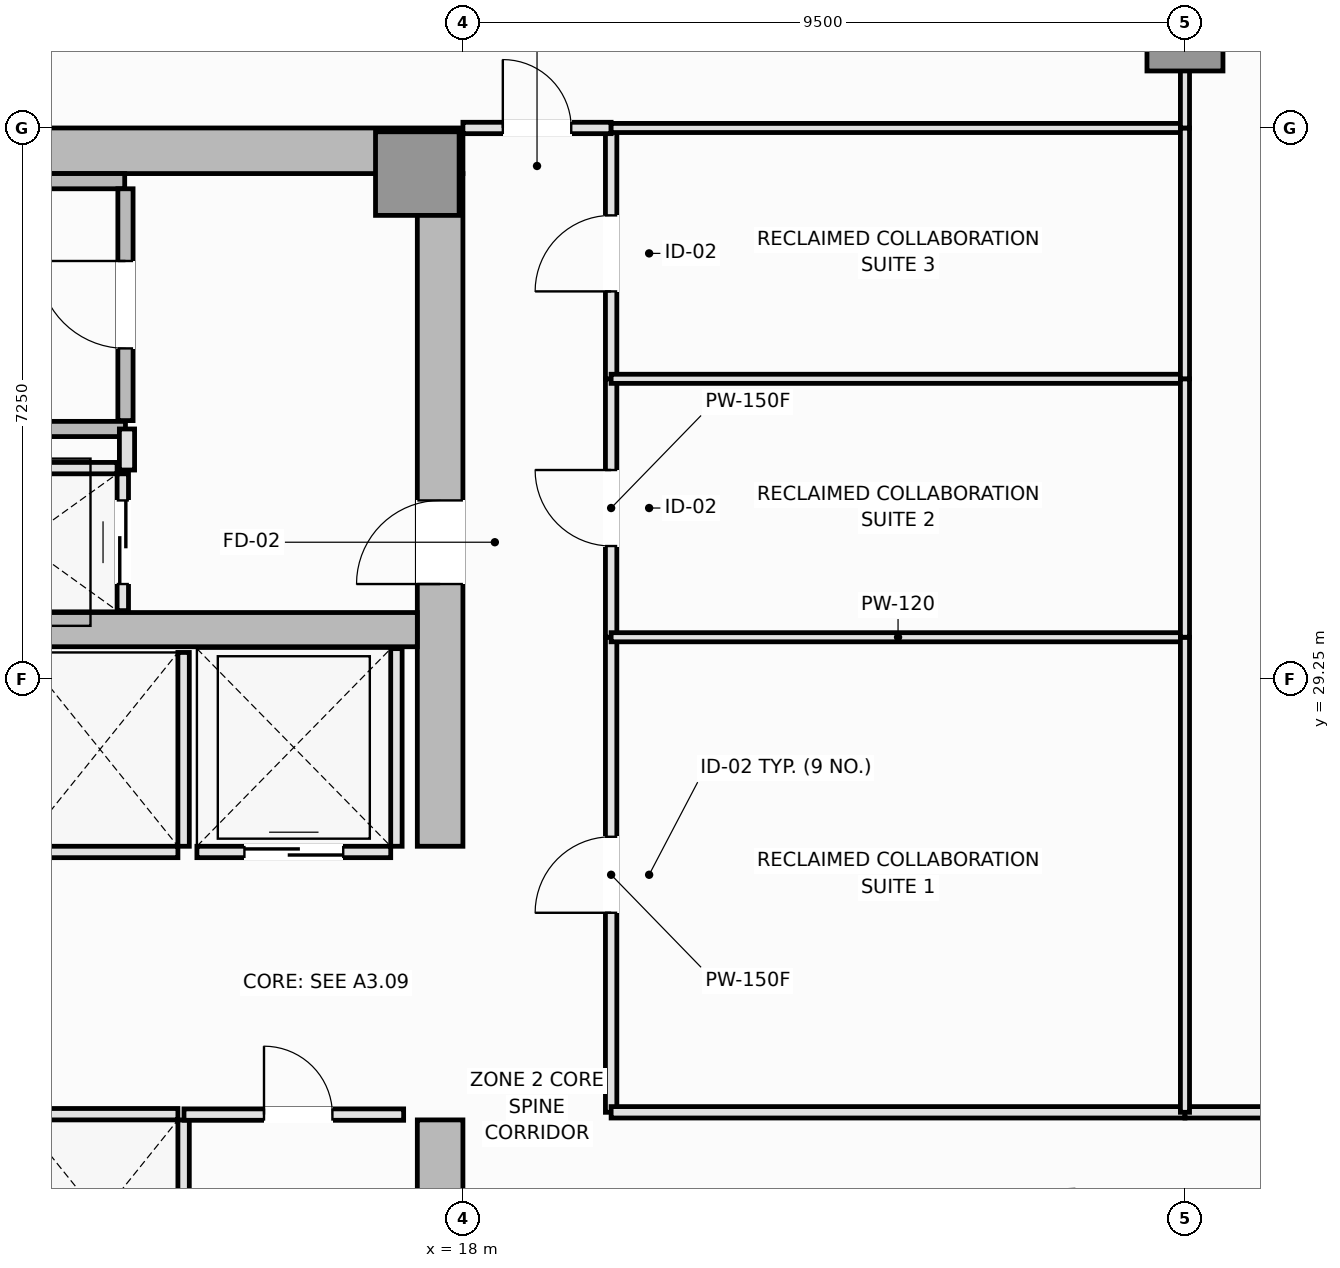
"""IFC4 building model, lengths in metres.
Left out: names, types, materials, properties, quantities, classifications, styles, units other than length and angle.
Written with IfcOpenShell. Run it as: python <this file> out.ifc"""

import sys

from ifc_helpers import new_model, si_unit, direction, frame, frame_2d, origin, origin_2d, place, context, subcontext, project, spatial, rectangle, extrude, element, fill, save


model = new_model("IFC4")
c1 = context("Model", 3, precision=1e-05, world=origin(), true_north=direction((0.0, 1.0)))
c2 = subcontext(c1, "Body", "Model", "MODEL_VIEW")
j1 = project(units=[si_unit("LENGTHUNIT", "METRE"), si_unit("PLANEANGLEUNIT", "RADIAN")], contexts=[c1])
p1 = place(None, origin())
s1 = spatial("IfcSite", under=j1, at=p1, CompositionType="ELEMENT")
p2 = place(p1, origin())
s2 = spatial("IfcBuilding", under=s1, at=p2, CompositionType="ELEMENT")
p3 = place(p2, frame((0.0, 0.0, 127.1)))
s3 = spatial("IfcBuildingStorey", under=s2, at=p3, CompositionType="ELEMENT", Elevation=127.1)
p4 = place(p3, frame((4.5, 36.2, 0.0), z_axis=(0.0, 0.0, 1.0), x_axis=(1.0, 0.0, 0.0)))
e1 = element("IfcWall", 1, at=p4, inside=s3, PredefinedType="SHEAR", context=c2, shape_type="SweptSolid", body=[
    extrude(rectangle(XDim=13.5, YDim=0.6, at=frame_2d((6.75, 0.0))), origin(), (0.0, 0.0, 1.0), 3.55),
])
p5 = place(p3, frame((17.7, 14.6, 0.0), z_axis=(0.0, 0.0, 1.0), x_axis=(0.0, 1.0, 0.0)))
e2 = element("IfcWall", 2, at=p5, inside=s3, PredefinedType="SHEAR", context=c2, shape_type="SweptSolid", body=[
    extrude(rectangle(XDim=8.85, YDim=0.6, at=frame_2d((4.425, 0.0))), origin(), (0.0, 0.0, 1.0), 3.55),
])
p6 = place(p5, frame((4.3, 0.0, 0.0)))
e3 = element("IfcOpeningElement", 3, at=p6, cuts=e2, PredefinedType="OPENING", context=c2, shape_type="SweptSolid", body=[
    extrude(rectangle(XDim=1.1, YDim=2.15, at=frame_2d((0.55, 1.075))), frame((0.0, 0.31, 0.0), z_axis=(0.0, -1.0, 0.0), x_axis=(1.0, 0.0, 0.0)), (0.0, 0.0, 1.0), 0.62),
])
p7 = place(p3, frame((17.7, 27.05, 0.0), z_axis=(0.0, 0.0, 1.0), x_axis=(0.0, 1.0, 0.0)))
e4 = element("IfcWall", 4, at=p7, inside=s3, PredefinedType="SHEAR", context=c2, shape_type="SweptSolid", body=[
    extrude(rectangle(XDim=8.85, YDim=0.6, at=frame_2d((4.425, 0.0))), origin(), (0.0, 0.0, 1.0), 3.55),
])
p8 = place(p7, frame((3.45, 0.0, 0.0)))
e5 = element("IfcOpeningElement", 5, at=p8, cuts=e4, PredefinedType="OPENING", context=c2, shape_type="SweptSolid", body=[
    extrude(rectangle(XDim=1.1, YDim=2.15, at=frame_2d((0.55, 1.075))), frame((0.0, 0.31, 0.0), z_axis=(0.0, -1.0, 0.0), x_axis=(1.0, 0.0, 0.0)), (0.0, 0.0, 1.0), 0.62),
])
p9 = place(p3, frame((5.1, 29.9, 0.0), z_axis=(0.0, 0.0, 1.0), x_axis=(1.0, 0.0, 0.0)))
e6 = element("IfcWall", 6, at=p9, inside=s3, PredefinedType="SHEAR", context=c2, shape_type="SweptSolid", body=[
    extrude(rectangle(XDim=12.3, YDim=0.45, at=frame_2d((6.15, 0.0))), origin(), (0.0, 0.0, 1.0), 3.55),
])
p10 = place(p3, frame((17.4, 35.9, 0.0), z_axis=(0.0, 0.0, 1.0), x_axis=(1.0, 0.0, 0.0)))
e7 = element("IfcColumn", 7, at=p10, inside=s3, PredefinedType="PILASTER", context=c2, shape_type="SweptSolid", body=[
    extrude(rectangle(XDim=1.1, YDim=1.1, at=origin_2d()), origin(), (0.0, 0.0, 1.0), 3.55),
])
p11 = place(p3, frame((27.5, 37.75, 0.0), z_axis=(0.0, 0.0, 1.0), x_axis=(1.0, 0.0, 0.0)))
e8 = element("IfcColumn", 8, at=p11, inside=s3, PredefinedType="COLUMN", context=c2, shape_type="SweptSolid", body=[
    extrude(rectangle(XDim=1.0, YDim=1.0, at=origin_2d()), origin(), (0.0, 0.0, 1.0), 3.55),
])
p12 = place(p3, frame((5.8, 35.8, 0.0), z_axis=(0.0, 0.0, 1.0), x_axis=(1.0, 0.0, 0.0)))
e9 = element("IfcWall", 9, at=p12, inside=s3, PredefinedType="SOLIDWALL", context=c2, shape_type="SweptSolid", body=[
    extrude(rectangle(XDim=7.75, YDim=0.2, at=frame_2d((3.875, 0.0))), origin(), (0.0, 0.0, 1.0), 3.55),
])
p13 = place(p3, frame((5.9, 32.54, 0.0), z_axis=(0.0, 0.0, 1.0), x_axis=(1.0, 0.0, 0.0)))
e10 = element("IfcWall", 10, at=p13, inside=s3, PredefinedType="SOLIDWALL", context=c2, shape_type="SweptSolid", body=[
    extrude(rectangle(XDim=7.66, YDim=0.2, at=frame_2d((3.83, 0.0))), origin(), (0.0, 0.0, 1.0), 3.55),
])
p14 = place(p3, frame((13.56, 32.65, 0.0), z_axis=(0.0, 0.0, 1.0), x_axis=(0.0, 1.0, 0.0)))
e11 = element("IfcWall", 11, at=p14, inside=s3, PredefinedType="SOLIDWALL", context=c2, shape_type="SweptSolid", body=[
    extrude(rectangle(XDim=3.05, YDim=0.2, at=frame_2d((1.525, 0.0))), origin(), (0.0, 0.0, 1.0), 3.55),
])
p15 = place(p14, frame((0.95, 0.0, 0.0)))
e12 = element("IfcOpeningElement", 12, at=p15, cuts=e11, PredefinedType="OPENING", context=c2, shape_type="SweptSolid", body=[
    extrude(rectangle(XDim=1.15, YDim=2.15, at=frame_2d((0.575, 1.075))), frame((0.0, 0.11, 0.0), z_axis=(0.0, -1.0, 0.0), x_axis=(1.0, 0.0, 0.0)), (0.0, 0.0, 1.0), 0.22),
])
p16 = place(p3, frame((12.2, 23.525, 0.0), z_axis=(0.0, 0.0, 1.0), x_axis=(1.0, 0.0, 0.0)))
e13 = element("IfcWall", 13, at=p16, inside=s3, PredefinedType="PARTITIONING", context=c2, shape_type="SweptSolid", body=[
    extrude(rectangle(XDim=2.05, YDim=0.15, at=frame_2d((1.025, 0.0))), origin(), (0.0, 0.0, 1.0), 3.37),
])
p17 = place(p3, frame((14.325, 20.9, 0.0), z_axis=(0.0, 0.0, 1.0), x_axis=(0.0, 1.0, 0.0)))
e14 = element("IfcWall", 14, at=p17, inside=s3, PredefinedType="PARTITIONING", context=c2, shape_type="SweptSolid", body=[
    extrude(rectangle(XDim=2.55, YDim=0.15, at=frame_2d((1.275, 0.0))), origin(), (0.0, 0.0, 1.0), 3.37),
])
p18 = place(p3, frame((12.2, 26.975, 0.0), z_axis=(0.0, 0.0, 1.0), x_axis=(1.0, 0.0, 0.0)))
e15 = element("IfcWall", 15, at=p18, inside=s3, PredefinedType="PARTITIONING", context=c2, shape_type="SweptSolid", body=[
    extrude(rectangle(XDim=2.05, YDim=0.15, at=frame_2d((1.025, 0.0))), origin(), (0.0, 0.0, 1.0), 3.37),
])
p19 = place(p3, frame((14.325, 27.05, 0.0), z_axis=(0.0, 0.0, 1.0), x_axis=(0.0, 1.0, 0.0)))
e16 = element("IfcWall", 16, at=p19, inside=s3, PredefinedType="PARTITIONING", context=c2, shape_type="SweptSolid", body=[
    extrude(rectangle(XDim=2.55, YDim=0.15, at=frame_2d((1.275, 0.0))), origin(), (0.0, 0.0, 1.0), 3.37),
])
p20 = place(p3, frame((14.5, 26.975, 0.0), z_axis=(0.0, 0.0, 1.0), x_axis=(1.0, 0.0, 0.0)))
e17 = element("IfcWall", 17, at=p20, inside=s3, PredefinedType="PARTITIONING", context=c2, shape_type="SweptSolid", body=[
    extrude(rectangle(XDim=2.55, YDim=0.15, at=frame_2d((1.275, 0.0))), origin(), (0.0, 0.0, 1.0), 3.37),
])
p21 = place(p20, frame((0.625, 0.0, 0.0)))
e18 = element("IfcOpeningElement", 18, at=p21, cuts=e17, PredefinedType="OPENING", context=c2, shape_type="SweptSolid", body=[
    extrude(rectangle(XDim=1.3, YDim=2.2, at=frame_2d((0.65, 1.1))), frame((0.0, 0.085, 0.0), z_axis=(0.0, -1.0, 0.0), x_axis=(1.0, 0.0, 0.0)), (0.0, 0.0, 1.0), 0.17),
])
p22 = place(p3, frame((17.125, 27.05, 0.0), z_axis=(0.0, 0.0, 1.0), x_axis=(0.0, 1.0, 0.0)))
e19 = element("IfcWall", 19, at=p22, inside=s3, PredefinedType="PARTITIONING", context=c2, shape_type="SweptSolid", body=[
    extrude(rectangle(XDim=2.6, YDim=0.15, at=frame_2d((1.3, 0.0))), origin(), (0.0, 0.0, 1.0), 3.37),
])
p23 = place(p3, frame((10.95, 32.025, 0.0), z_axis=(0.0, 0.0, 1.0), x_axis=(1.0, 0.0, 0.0)))
e20 = element("IfcWall", 20, at=p23, inside=s3, PredefinedType="PARTITIONING", context=c2, shape_type="SweptSolid", body=[
    extrude(rectangle(XDim=2.5, YDim=0.15, at=frame_2d((1.25, 0.0))), origin(), (0.0, 0.0, 1.0), 3.37),
])
p24 = place(p3, frame((13.525, 30.15, 0.0), z_axis=(0.0, 0.0, 1.0), x_axis=(0.0, 1.0, 0.0)))
e21 = element("IfcWall", 21, at=p24, inside=s3, PredefinedType="PARTITIONING", context=c2, shape_type="SweptSolid", body=[
    extrude(rectangle(XDim=1.8, YDim=0.15, at=frame_2d((0.9, 0.0))), origin(), (0.0, 0.0, 1.0), 3.37),
])
p25 = place(p24, frame((0.35, 0.0, 0.0)))
e22 = element("IfcOpeningElement", 22, at=p25, cuts=e21, PredefinedType="OPENING", context=c2, shape_type="SweptSolid", body=[
    extrude(rectangle(XDim=1.1, YDim=2.2, at=frame_2d((0.55, 1.1))), frame((0.0, 0.085, 0.0), z_axis=(0.0, -1.0, 0.0), x_axis=(1.0, 0.0, 0.0)), (0.0, 0.0, 1.0), 0.17),
])
p26 = place(p3, frame((13.58, 32.0, 0.0), z_axis=(0.0, 0.0, 1.0), x_axis=(0.0, 1.0, 0.0)))
e23 = element("IfcWall", 23, at=p26, inside=s3, PredefinedType="PARTITIONING", context=c2, shape_type="SweptSolid", body=[
    extrude(rectangle(XDim=0.54, YDim=0.2, at=frame_2d((0.27, 0.0))), origin(), (0.0, 0.0, 1.0), 3.37),
])
p27 = place(p3, frame((14.33, 23.52, 0.0), z_axis=(0.0, 0.0, 1.0), x_axis=(1.0, 0.0, 0.0)))
e24 = element("IfcWall", 24, at=p27, inside=s3, PredefinedType="PARTITIONING", context=c2, shape_type="SweptSolid", body=[
    extrude(rectangle(XDim=2.89, YDim=0.15, at=frame_2d((1.445, 0.0))), origin(), (0.0, 0.0, 1.0), 3.37),
])
p28 = place(p27, frame((1.053, 0.0, 0.0)))
e25 = element("IfcOpeningElement", 25, at=p28, cuts=e24, PredefinedType="OPENING", context=c2, shape_type="SweptSolid", body=[
    extrude(rectangle(XDim=0.9, YDim=2.1, at=frame_2d((0.45, 1.05))), frame((0.0, 0.085, 0.0), z_axis=(0.0, -1.0, 0.0), x_axis=(1.0, 0.0, 0.0)), (0.0, 0.0, 1.0), 0.17),
])
p29 = place(p3, frame((19.95, 23.55, 0.0), z_axis=(0.0, 0.0, 1.0), x_axis=(0.0, 1.0, 0.0)))
e26 = element("IfcWall", 26, at=p29, inside=s3, PredefinedType="PARTITIONING", context=c2, shape_type="SweptSolid", body=[
    extrude(rectangle(XDim=6.25, YDim=0.15, at=frame_2d((3.125, 0.0))), origin(), (0.0, 0.0, 1.0), 3.37),
])
p30 = place(p29, frame((2.625, 0.0, 0.0)))
e27 = element("IfcOpeningElement", 27, at=p30, cuts=e26, PredefinedType="OPENING", context=c2, shape_type="SweptSolid", body=[
    extrude(rectangle(XDim=1.0, YDim=2.15, at=frame_2d((0.5, 1.075))), frame((0.0, 0.085, 0.0), z_axis=(0.0, -1.0, 0.0), x_axis=(1.0, 0.0, 0.0)), (0.0, 0.0, 1.0), 0.17),
])
p31 = place(p3, frame((19.95, 29.8, 0.0), z_axis=(0.0, 0.0, 1.0), x_axis=(0.0, 1.0, 0.0)))
e28 = element("IfcWall", 28, at=p31, inside=s3, PredefinedType="PARTITIONING", context=c2, shape_type="SweptSolid", body=[
    extrude(rectangle(XDim=3.4, YDim=0.15, at=frame_2d((1.7, 0.0))), origin(), (0.0, 0.0, 1.0), 3.37),
])
p32 = place(p31, frame((1.2, 0.0, 0.0)))
e29 = element("IfcOpeningElement", 29, at=p32, cuts=e28, PredefinedType="OPENING", context=c2, shape_type="SweptSolid", body=[
    extrude(rectangle(XDim=1.0, YDim=2.15, at=frame_2d((0.5, 1.075))), frame((0.0, 0.085, 0.0), z_axis=(0.0, -1.0, 0.0), x_axis=(1.0, 0.0, 0.0)), (0.0, 0.0, 1.0), 0.17),
])
p33 = place(p3, frame((19.95, 33.2, 0.0), z_axis=(0.0, 0.0, 1.0), x_axis=(0.0, 1.0, 0.0)))
e30 = element("IfcWall", 30, at=p33, inside=s3, PredefinedType="PARTITIONING", context=c2, shape_type="SweptSolid", body=[
    extrude(rectangle(XDim=3.3, YDim=0.15, at=frame_2d((1.65, 0.0))), origin(), (0.0, 0.0, 1.0), 3.37),
])
p34 = place(p33, frame((1.15, 0.0, 0.0)))
e31 = element("IfcOpeningElement", 31, at=p34, cuts=e30, PredefinedType="OPENING", context=c2, shape_type="SweptSolid", body=[
    extrude(rectangle(XDim=1.0, YDim=2.15, at=frame_2d((0.5, 1.075))), frame((0.0, 0.085, 0.0), z_axis=(0.0, -1.0, 0.0), x_axis=(1.0, 0.0, 0.0)), (0.0, 0.0, 1.0), 0.17),
])
p35 = place(p3, frame((18.0, 36.5, 0.0), z_axis=(0.0, 0.0, 1.0), x_axis=(1.0, 0.0, 0.0)))
e32 = element("IfcWall", 32, at=p35, inside=s3, PredefinedType="PARTITIONING", context=c2, shape_type="SweptSolid", body=[
    extrude(rectangle(XDim=1.95, YDim=0.15, at=frame_2d((0.975, 0.0))), origin(), (0.0, 0.0, 1.0), 3.37),
])
p36 = place(p35, frame((0.525, 0.0, 0.0)))
e33 = element("IfcOpeningElement", 33, at=p36, cuts=e32, PredefinedType="OPENING", context=c2, shape_type="SweptSolid", body=[
    extrude(rectangle(XDim=0.9, YDim=2.1, at=frame_2d((0.45, 1.05))), frame((0.0, 0.085, 0.0), z_axis=(0.0, -1.0, 0.0), x_axis=(1.0, 0.0, 0.0)), (0.0, 0.0, 1.0), 0.17),
])
p37 = place(p3, frame((19.95, 23.55, 0.0), z_axis=(0.0, 0.0, 1.0), x_axis=(1.0, 0.0, 0.0)))
e34 = element("IfcWall", 34, at=p37, inside=s3, PredefinedType="PARTITIONING", context=c2, shape_type="SweptSolid", body=[
    extrude(rectangle(XDim=7.55, YDim=0.15, at=frame_2d((3.775, 0.0))), origin(), (0.0, 0.0, 1.0), 3.37),
])
p38 = place(p3, frame((27.5, 23.55, 0.0), z_axis=(0.0, 0.0, 1.0), x_axis=(1.0, 0.0, 0.0)))
e35 = element("IfcWall", 35, at=p38, inside=s3, PredefinedType="PARTITIONING", context=c2, shape_type="SweptSolid", body=[
    extrude(rectangle(XDim=4.3, YDim=0.15, at=frame_2d((2.15, 0.0))), origin(), (0.0, 0.0, 1.0), 3.37),
])
p39 = place(p38, frame((1.65, 0.0, 0.0)))
e36 = element("IfcOpeningElement", 36, at=p39, cuts=e35, PredefinedType="OPENING", context=c2, shape_type="SweptSolid", body=[
    extrude(rectangle(XDim=1.0, YDim=2.15, at=frame_2d((0.5, 1.075))), frame((0.0, 0.085, 0.0), z_axis=(0.0, -1.0, 0.0), x_axis=(1.0, 0.0, 0.0)), (0.0, 0.0, 1.0), 0.17),
])
p40 = place(p3, frame((19.95, 29.8, 0.0), z_axis=(0.0, 0.0, 1.0), x_axis=(1.0, 0.0, 0.0)))
e37 = element("IfcWall", 37, at=p40, inside=s3, PredefinedType="PARTITIONING", context=c2, shape_type="SweptSolid", body=[
    extrude(rectangle(XDim=7.55, YDim=0.12, at=frame_2d((3.775, 0.0))), origin(), (0.0, 0.0, 1.0), 3.37),
])
p41 = place(p3, frame((27.5, 23.55, 0.0), z_axis=(0.0, 0.0, 1.0), x_axis=(0.0, 1.0, 0.0)))
e38 = element("IfcWall", 38, at=p41, inside=s3, PredefinedType="PARTITIONING", context=c2, shape_type="SweptSolid", body=[
    extrude(rectangle(XDim=6.25, YDim=0.12, at=frame_2d((3.125, 0.0))), origin(), (0.0, 0.0, 1.0), 3.37),
])
p42 = place(p3, frame((19.95, 33.2, 0.0), z_axis=(0.0, 0.0, 1.0), x_axis=(1.0, 0.0, 0.0)))
e39 = element("IfcWall", 39, at=p42, inside=s3, PredefinedType="PARTITIONING", context=c2, shape_type="SweptSolid", body=[
    extrude(rectangle(XDim=7.55, YDim=0.12, at=frame_2d((3.775, 0.0))), origin(), (0.0, 0.0, 1.0), 3.37),
])
p43 = place(p3, frame((27.5, 29.8, 0.0), z_axis=(0.0, 0.0, 1.0), x_axis=(0.0, 1.0, 0.0)))
e40 = element("IfcWall", 40, at=p43, inside=s3, PredefinedType="PARTITIONING", context=c2, shape_type="SweptSolid", body=[
    extrude(rectangle(XDim=3.4, YDim=0.12, at=frame_2d((1.7, 0.0))), origin(), (0.0, 0.0, 1.0), 3.37),
])
p44 = place(p3, frame((19.95, 36.5, 0.0), z_axis=(0.0, 0.0, 1.0), x_axis=(1.0, 0.0, 0.0)))
e41 = element("IfcWall", 41, at=p44, inside=s3, PredefinedType="PARTITIONING", context=c2, shape_type="SweptSolid", body=[
    extrude(rectangle(XDim=7.55, YDim=0.12, at=frame_2d((3.775, 0.0))), origin(), (0.0, 0.0, 1.0), 3.37),
])
p45 = place(p3, frame((27.5, 33.2, 0.0), z_axis=(0.0, 0.0, 1.0), x_axis=(0.0, 1.0, 0.0)))
e42 = element("IfcWall", 42, at=p45, inside=s3, PredefinedType="PARTITIONING", context=c2, shape_type="SweptSolid", body=[
    extrude(rectangle(XDim=3.3, YDim=0.12, at=frame_2d((1.65, 0.0))), origin(), (0.0, 0.0, 1.0), 3.37),
])
p46 = place(p3, frame((27.5, 36.5, 0.0), z_axis=(0.0, 0.0, 1.0), x_axis=(0.0, 1.0, 0.0)))
e43 = element("IfcWall", 43, at=p46, inside=s3, PredefinedType="PARTITIONING", context=c2, shape_type="SweptSolid", body=[
    extrude(rectangle(XDim=9.99, YDim=0.12, at=frame_2d((4.995, 0.0))), origin(), (0.0, 0.0, 1.0), 2.87),
])
p47 = place(p15, origin())
e44 = element("IfcDoor", 44, at=p47, inside=s3, OperationType="SINGLE_SWING_RIGHT", PredefinedType="DOOR", context=c2, shape_type="SweptSolid", body=[
    extrude(rectangle(XDim=1.15, YDim=2.15, at=frame_2d((0.575, 1.075))), frame((0.0, 0.025, 0.0), z_axis=(0.0, -1.0, 0.0), x_axis=(1.0, 0.0, 0.0)), (0.0, 0.0, 1.0), 0.05),
])
fill(e12, e44)
p48 = place(p21, origin())
e45 = element("IfcDoor", 45, at=p48, inside=s3, OperationType="DOUBLE_DOOR_SLIDING", PredefinedType="DOOR", context=c2, shape_type="SweptSolid", body=[
    extrude(rectangle(XDim=1.3, YDim=2.2, at=frame_2d((0.65, 1.1))), frame((0.0, 0.025, 0.0), z_axis=(0.0, -1.0, 0.0), x_axis=(1.0, 0.0, 0.0)), (0.0, 0.0, 1.0), 0.05),
])
fill(e18, e45)
p49 = place(p25, origin())
e46 = element("IfcDoor", 46, at=p49, inside=s3, OperationType="DOUBLE_DOOR_SLIDING", PredefinedType="DOOR", context=c2, shape_type="SweptSolid", body=[
    extrude(rectangle(XDim=1.1, YDim=2.2, at=frame_2d((0.55, 1.1))), frame((0.0, 0.025, 0.0), z_axis=(0.0, -1.0, 0.0), x_axis=(1.0, 0.0, 0.0)), (0.0, 0.0, 1.0), 0.05),
])
fill(e22, e46)
p50 = place(p8, origin())
e47 = element("IfcDoor", 47, at=p50, inside=s3, OperationType="SINGLE_SWING_LEFT", PredefinedType="DOOR", context=c2, shape_type="SweptSolid", body=[
    extrude(rectangle(XDim=1.1, YDim=2.15, at=frame_2d((0.55, 1.075))), frame((0.0, 0.025, 0.0), z_axis=(0.0, -1.0, 0.0), x_axis=(1.0, 0.0, 0.0)), (0.0, 0.0, 1.0), 0.05),
])
fill(e5, e47)
p51 = place(p28, origin())
e48 = element("IfcDoor", 48, at=p51, inside=s3, OperationType="SINGLE_SWING_LEFT", PredefinedType="DOOR", context=c2, shape_type="SweptSolid", body=[
    extrude(rectangle(XDim=0.9, YDim=2.1, at=frame_2d((0.45, 1.05))), frame((0.0, 0.025, 0.0), z_axis=(0.0, -1.0, 0.0), x_axis=(1.0, 0.0, 0.0)), (0.0, 0.0, 1.0), 0.05),
])
fill(e25, e48)
p52 = place(p30, origin())
e49 = element("IfcDoor", 49, at=p52, inside=s3, OperationType="SINGLE_SWING_LEFT", PredefinedType="DOOR", context=c2, shape_type="SweptSolid", body=[
    extrude(rectangle(XDim=1.0, YDim=2.15, at=frame_2d((0.5, 1.075))), frame((0.0, 0.025, 0.0), z_axis=(0.0, -1.0, 0.0), x_axis=(1.0, 0.0, 0.0)), (0.0, 0.0, 1.0), 0.05),
])
fill(e27, e49)
p53 = place(p32, origin())
e50 = element("IfcDoor", 50, at=p53, inside=s3, OperationType="SINGLE_SWING_RIGHT", PredefinedType="DOOR", context=c2, shape_type="SweptSolid", body=[
    extrude(rectangle(XDim=1.0, YDim=2.15, at=frame_2d((0.5, 1.075))), frame((0.0, 0.025, 0.0), z_axis=(0.0, -1.0, 0.0), x_axis=(1.0, 0.0, 0.0)), (0.0, 0.0, 1.0), 0.05),
])
fill(e29, e50)
p54 = place(p34, origin())
e51 = element("IfcDoor", 51, at=p54, inside=s3, OperationType="SINGLE_SWING_LEFT", PredefinedType="DOOR", context=c2, shape_type="SweptSolid", body=[
    extrude(rectangle(XDim=1.0, YDim=2.15, at=frame_2d((0.5, 1.075))), frame((0.0, 0.025, 0.0), z_axis=(0.0, -1.0, 0.0), x_axis=(1.0, 0.0, 0.0)), (0.0, 0.0, 1.0), 0.05),
])
fill(e31, e51)
p55 = place(p36, origin())
e52 = element("IfcDoor", 52, at=p55, inside=s3, OperationType="SINGLE_SWING_LEFT", PredefinedType="DOOR", context=c2, shape_type="SweptSolid", body=[
    extrude(rectangle(XDim=0.9, YDim=2.1, at=frame_2d((0.45, 1.05))), frame((0.0, 0.025, 0.0), z_axis=(0.0, -1.0, 0.0), x_axis=(1.0, 0.0, 0.0)), (0.0, 0.0, 1.0), 0.05),
])
fill(e33, e52)
save(model, sys.argv[1])
